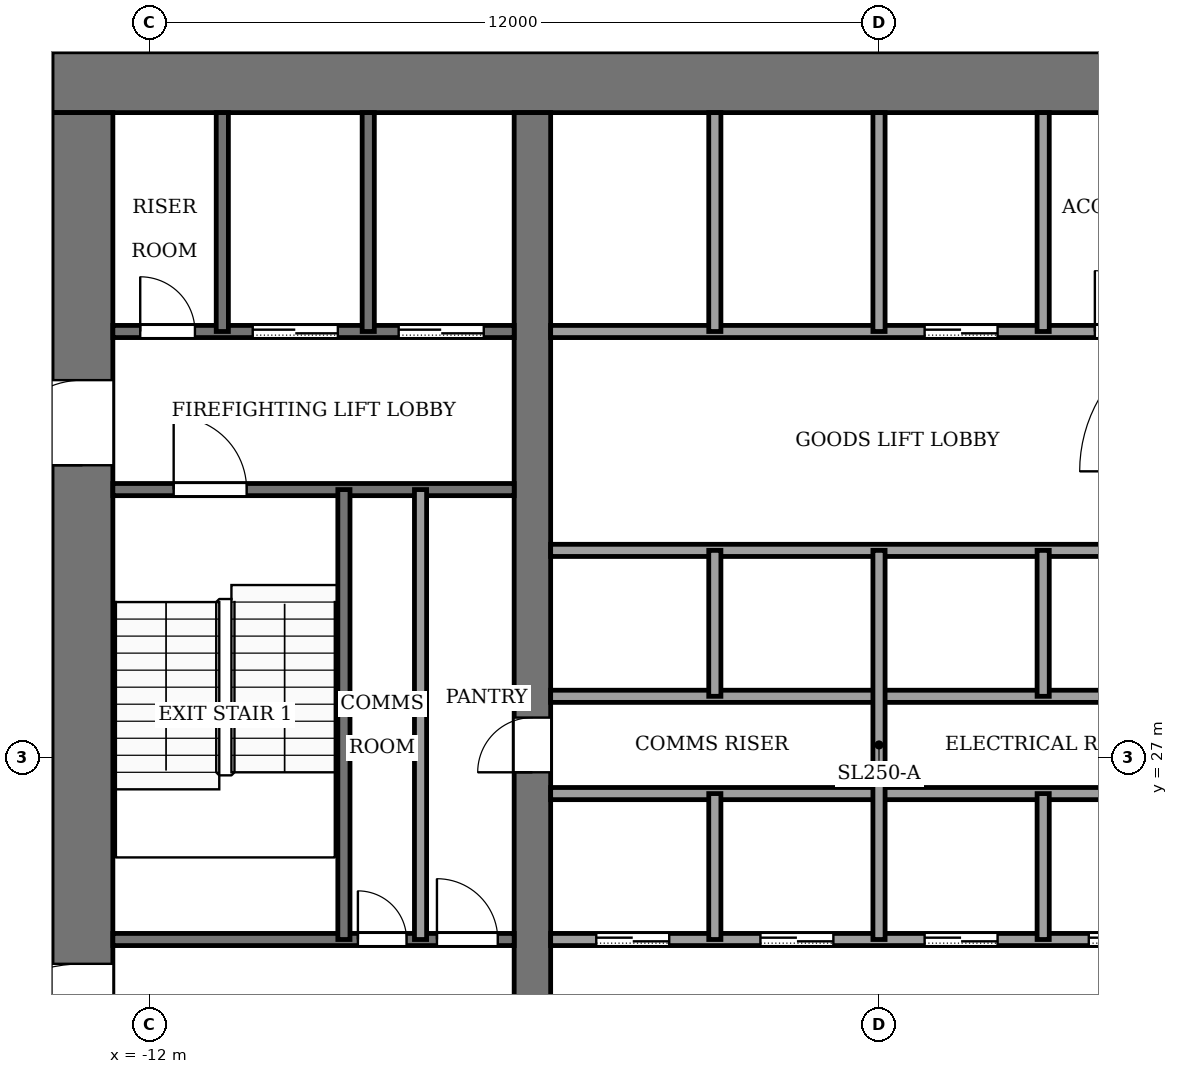
"""IFC4 building model, lengths in metres.
Left out: names, types, materials, properties, quantities, classifications, styles, units other than length and angle.
Written with IfcOpenShell. Run it as: python <this file> out.ifc"""

import sys

from ifc_helpers import new_model, si_unit, direction, frame, frame_2d, origin, place, context, subcontext, project, spatial, rectangle, extrude, element, fill, save


model = new_model("IFC4")
c1 = context("Model", 3, precision=1e-05, world=origin(), true_north=direction((0.0, 1.0)))
c2 = subcontext(c1, "Body", "Model", "MODEL_VIEW")
j1 = project(units=[si_unit("LENGTHUNIT", "METRE"), si_unit("PLANEANGLEUNIT", "RADIAN")], contexts=[c1])
p1 = place(None, origin())
s1 = spatial("IfcSite", under=j1, at=p1, CompositionType="ELEMENT")
p2 = place(p1, origin())
s2 = spatial("IfcBuilding", under=s1, at=p2, CompositionType="ELEMENT")
p3 = place(p2, frame((0.0, 0.0, 134.0)))
s3 = spatial("IfcBuildingStorey", under=s2, at=p3, CompositionType="ELEMENT", Elevation=134.0)
p4 = place(p3, frame((-13.6, 38.1, -0.13), z_axis=(0.0, 0.0, 1.0), x_axis=(1.0, 0.0, 0.0)))
e1 = element("IfcWall", 1, at=p4, inside=s3, PredefinedType="SHEAR", context=c2, shape_type="SweptSolid", body=[
    extrude(rectangle(XDim=27.2, YDim=1.0, at=frame_2d((13.6, 0.0))), origin(), (0.0, 0.0, 1.0), 4.0),
])
p5 = place(p3, frame((-13.1, 18.4, -0.13), z_axis=(0.0, 0.0, 1.0), x_axis=(0.0, 1.0, 0.0)))
e2 = element("IfcWall", 2, at=p5, inside=s3, PredefinedType="SHEAR", context=c2, shape_type="SweptSolid", body=[
    extrude(rectangle(XDim=19.2, YDim=1.0, at=frame_2d((9.6, 0.0))), origin(), (0.0, 0.0, 1.0), 4.0),
])
p6 = place(p5, frame((2.8, 0.0, 0.13)))
e3 = element("IfcOpeningElement", 3, at=p6, cuts=e2, PredefinedType="OPENING", context=c2, shape_type="SweptSolid", body=[
    extrude(rectangle(XDim=2.4, YDim=2.4, at=frame_2d((1.2, 1.2))), frame((0.0, 0.51, 0.0), z_axis=(0.0, -1.0, 0.0), x_axis=(1.0, 0.0, 0.0)), (0.0, 0.0, 1.0), 1.02),
])
p7 = place(p5, frame((13.4, 0.0, 0.13)))
e4 = element("IfcOpeningElement", 4, at=p7, cuts=e2, PredefinedType="OPENING", context=c2, shape_type="SweptSolid", body=[
    extrude(rectangle(XDim=1.4, YDim=2.2, at=frame_2d((0.7, 1.1))), frame((0.0, 0.51, 0.0), z_axis=(0.0, -1.0, 0.0), x_axis=(1.0, 0.0, 0.0)), (0.0, 0.0, 1.0), 1.02),
])
p8 = place(p3, frame((-5.7, 18.4, -0.13), z_axis=(0.0, 0.0, 1.0), x_axis=(0.0, 1.0, 0.0)))
e5 = element("IfcWall", 5, at=p8, inside=s3, PredefinedType="SHEAR", context=c2, shape_type="SweptSolid", body=[
    extrude(rectangle(XDim=19.2, YDim=0.6, at=frame_2d((9.6, 0.0))), origin(), (0.0, 0.0, 1.0), 4.0),
])
p9 = place(p8, frame((8.35, 0.0, 0.13)))
e6 = element("IfcOpeningElement", 6, at=p9, cuts=e5, PredefinedType="OPENING", context=c2, shape_type="SweptSolid", body=[
    extrude(rectangle(XDim=0.9, YDim=2.1, at=frame_2d((0.45, 1.05))), frame((0.0, 0.31, 0.0), z_axis=(0.0, -1.0, 0.0), x_axis=(1.0, 0.0, 0.0)), (0.0, 0.0, 1.0), 0.62),
])
p10 = place(p3, frame((-12.6, 24.0, 0.0), z_axis=(0.0, 0.0, 1.0), x_axis=(1.0, 0.0, 0.0)))
e7 = element("IfcWall", 7, at=p10, inside=s3, PredefinedType="PARTITIONING", context=c2, shape_type="SweptSolid", body=[
    extrude(rectangle(XDim=6.6, YDim=0.2, at=frame_2d((3.3, 0.0))), origin(), (0.0, 0.0, 1.0), 3.87),
])
p11 = place(p10, frame((4.03, 0.0, 0.0)))
e8 = element("IfcOpeningElement", 8, at=p11, cuts=e7, PredefinedType="OPENING", context=c2, shape_type="SweptSolid", body=[
    extrude(rectangle(XDim=0.8, YDim=2.1, at=frame_2d((0.4, 1.05))), frame((0.0, 0.11, 0.0), z_axis=(0.0, -1.0, 0.0), x_axis=(1.0, 0.0, 0.0)), (0.0, 0.0, 1.0), 0.22),
])
p12 = place(p10, frame((5.33, 0.0, 0.0)))
e9 = element("IfcOpeningElement", 9, at=p12, cuts=e7, PredefinedType="OPENING", context=c2, shape_type="SweptSolid", body=[
    extrude(rectangle(XDim=1.0, YDim=2.1, at=frame_2d((0.5, 1.05))), frame((0.0, 0.11, 0.0), z_axis=(0.0, -1.0, 0.0), x_axis=(1.0, 0.0, 0.0)), (0.0, 0.0, 1.0), 0.22),
])
p13 = place(p3, frame((-5.4, 24.0, 0.0), z_axis=(0.0, 0.0, 1.0), x_axis=(1.0, 0.0, 0.0)))
e10 = element("IfcWall", 10, at=p13, inside=s3, PredefinedType="PARTITIONING", context=c2, shape_type="SweptSolid", body=[
    extrude(rectangle(XDim=10.8, YDim=0.2, at=frame_2d((5.4, 0.0))), origin(), (0.0, 0.0, 1.0), 3.87),
])
p14 = place(p13, frame((0.75, 0.0, 0.0)))
e11 = element("IfcOpeningElement", 11, at=p14, cuts=e10, PredefinedType="OPENING", context=c2, shape_type="SweptSolid", body=[
    extrude(rectangle(XDim=1.2, YDim=2.2, at=frame_2d((0.6, 1.1))), frame((0.0, 0.11, 0.0), z_axis=(0.0, -1.0, 0.0), x_axis=(1.0, 0.0, 0.0)), (0.0, 0.0, 1.0), 0.22),
])
p15 = place(p13, frame((3.45, 0.0, 0.0)))
e12 = element("IfcOpeningElement", 12, at=p15, cuts=e10, PredefinedType="OPENING", context=c2, shape_type="SweptSolid", body=[
    extrude(rectangle(XDim=1.2, YDim=2.2, at=frame_2d((0.6, 1.1))), frame((0.0, 0.11, 0.0), z_axis=(0.0, -1.0, 0.0), x_axis=(1.0, 0.0, 0.0)), (0.0, 0.0, 1.0), 0.22),
])
p16 = place(p13, frame((6.15, 0.0, 0.0)))
e13 = element("IfcOpeningElement", 13, at=p16, cuts=e10, PredefinedType="OPENING", context=c2, shape_type="SweptSolid", body=[
    extrude(rectangle(XDim=1.2, YDim=2.2, at=frame_2d((0.6, 1.1))), frame((0.0, 0.11, 0.0), z_axis=(0.0, -1.0, 0.0), x_axis=(1.0, 0.0, 0.0)), (0.0, 0.0, 1.0), 0.22),
])
p17 = place(p13, frame((8.85, 0.0, 0.0)))
e14 = element("IfcOpeningElement", 14, at=p17, cuts=e10, PredefinedType="OPENING", context=c2, shape_type="SweptSolid", body=[
    extrude(rectangle(XDim=1.2, YDim=2.2, at=frame_2d((0.6, 1.1))), frame((0.0, 0.11, 0.0), z_axis=(0.0, -1.0, 0.0), x_axis=(1.0, 0.0, 0.0)), (0.0, 0.0, 1.0), 0.22),
])
for number, where, z_axis, x_axis in (
    (15, (-5.4, 26.4, 0.0), (0.0, 0.0, 1.0), (1.0, 0.0, 0.0)),
    (16, (-5.4, 28.0, 0.0), (0.0, 0.0, 1.0), (1.0, 0.0, 0.0)),
    (17, (-5.4, 30.4, 0.0), (0.0, 0.0, 1.0), (1.0, 0.0, 0.0)),
):
    element("IfcWall", number, at=place(p3, frame(where, z_axis=z_axis, x_axis=x_axis)), inside=s3, PredefinedType="PARTITIONING", context=c2, shape_type="SweptSolid", body=[
        extrude(rectangle(XDim=10.8, YDim=0.2, at=frame_2d((5.4, 0.0))), origin(), (0.0, 0.0, 1.0), 3.87),
    ])
p18 = place(p3, frame((-12.6, 31.4, 0.0), z_axis=(0.0, 0.0, 1.0), x_axis=(1.0, 0.0, 0.0)))
e18 = element("IfcWall", 18, at=p18, inside=s3, PredefinedType="PARTITIONING", context=c2, shape_type="SweptSolid", body=[
    extrude(rectangle(XDim=6.6, YDim=0.2, at=frame_2d((3.3, 0.0))), origin(), (0.0, 0.0, 1.0), 3.87),
])
p19 = place(p18, frame((1.0, 0.0, 0.0)))
e19 = element("IfcOpeningElement", 19, at=p19, cuts=e18, PredefinedType="OPENING", context=c2, shape_type="SweptSolid", body=[
    extrude(rectangle(XDim=1.2, YDim=2.2, at=frame_2d((0.6, 1.1))), frame((0.0, 0.11, 0.0), z_axis=(0.0, -1.0, 0.0), x_axis=(1.0, 0.0, 0.0)), (0.0, 0.0, 1.0), 0.22),
])
p20 = place(p3, frame((-12.6, 34.0, 0.0), z_axis=(0.0, 0.0, 1.0), x_axis=(1.0, 0.0, 0.0)))
e20 = element("IfcWall", 20, at=p20, inside=s3, PredefinedType="PARTITIONING", context=c2, shape_type="SweptSolid", body=[
    extrude(rectangle(XDim=6.6, YDim=0.2, at=frame_2d((3.3, 0.0))), origin(), (0.0, 0.0, 1.0), 3.87),
])
p21 = place(p20, frame((4.7, 0.0, 0.0)))
e21 = element("IfcOpeningElement", 21, at=p21, cuts=e20, PredefinedType="OPENING", context=c2, shape_type="SweptSolid", body=[
    extrude(rectangle(XDim=1.4, YDim=2.2, at=frame_2d((0.7, 1.1))), frame((0.0, 0.11, 0.0), z_axis=(0.0, -1.0, 0.0), x_axis=(1.0, 0.0, 0.0)), (0.0, 0.0, 1.0), 0.22),
])
p22 = place(p20, frame((2.3, 0.0, 0.0)))
e22 = element("IfcOpeningElement", 22, at=p22, cuts=e20, PredefinedType="OPENING", context=c2, shape_type="SweptSolid", body=[
    extrude(rectangle(XDim=1.4, YDim=2.2, at=frame_2d((0.7, 1.1))), frame((0.0, 0.11, 0.0), z_axis=(0.0, -1.0, 0.0), x_axis=(1.0, 0.0, 0.0)), (0.0, 0.0, 1.0), 0.22),
])
p23 = place(p20, frame((0.45, 0.0, 0.0)))
e23 = element("IfcOpeningElement", 23, at=p23, cuts=e20, PredefinedType="OPENING", context=c2, shape_type="SweptSolid", body=[
    extrude(rectangle(XDim=0.9, YDim=2.1, at=frame_2d((0.45, 1.05))), frame((0.0, 0.11, 0.0), z_axis=(0.0, -1.0, 0.0), x_axis=(1.0, 0.0, 0.0)), (0.0, 0.0, 1.0), 0.22),
])
p24 = place(p3, frame((-5.4, 34.0, 0.0), z_axis=(0.0, 0.0, 1.0), x_axis=(1.0, 0.0, 0.0)))
e24 = element("IfcWall", 24, at=p24, inside=s3, PredefinedType="PARTITIONING", context=c2, shape_type="SweptSolid", body=[
    extrude(rectangle(XDim=10.8, YDim=0.2, at=frame_2d((5.4, 0.0))), origin(), (0.0, 0.0, 1.0), 3.87),
])
p25 = place(p24, frame((6.15, 0.0, 0.0)))
e25 = element("IfcOpeningElement", 25, at=p25, cuts=e24, PredefinedType="OPENING", context=c2, shape_type="SweptSolid", body=[
    extrude(rectangle(XDim=1.2, YDim=2.2, at=frame_2d((0.6, 1.1))), frame((0.0, 0.11, 0.0), z_axis=(0.0, -1.0, 0.0), x_axis=(1.0, 0.0, 0.0)), (0.0, 0.0, 1.0), 0.22),
])
p26 = place(p24, frame((8.95, 0.0, 0.0)))
e26 = element("IfcOpeningElement", 26, at=p26, cuts=e24, PredefinedType="OPENING", context=c2, shape_type="SweptSolid", body=[
    extrude(rectangle(XDim=1.0, YDim=2.1, at=frame_2d((0.5, 1.05))), frame((0.0, 0.11, 0.0), z_axis=(0.0, -1.0, 0.0), x_axis=(1.0, 0.0, 0.0)), (0.0, 0.0, 1.0), 0.22),
])
p27 = place(p3, frame((-10.8, 34.0, 0.0), z_axis=(0.0, 0.0, 1.0), x_axis=(0.0, 1.0, 0.0)))
e27 = element("IfcWall", 27, at=p27, inside=s3, PredefinedType="PARTITIONING", context=c2, shape_type="SweptSolid", body=[
    extrude(rectangle(XDim=3.6, YDim=0.2, at=frame_2d((1.8, 0.0))), origin(), (0.0, 0.0, 1.0), 3.87),
])
p28 = place(p3, frame((-8.8, 24.0, 0.0), z_axis=(0.0, 0.0, 1.0), x_axis=(0.0, 1.0, 0.0)))
e28 = element("IfcWall", 28, at=p28, inside=s3, PredefinedType="PARTITIONING", context=c2, shape_type="SweptSolid", body=[
    extrude(rectangle(XDim=7.4, YDim=0.2, at=frame_2d((3.7, 0.0))), origin(), (0.0, 0.0, 1.0), 3.87),
])
p29 = place(p3, frame((-8.4, 34.0, 0.0), z_axis=(0.0, 0.0, 1.0), x_axis=(0.0, 1.0, 0.0)))
e29 = element("IfcWall", 29, at=p29, inside=s3, PredefinedType="PARTITIONING", context=c2, shape_type="SweptSolid", body=[
    extrude(rectangle(XDim=3.6, YDim=0.2, at=frame_2d((1.8, 0.0))), origin(), (0.0, 0.0, 1.0), 3.87),
])
p30 = place(p3, frame((-7.54, 24.0, 0.0), z_axis=(0.0, 0.0, 1.0), x_axis=(0.0, 1.0, 0.0)))
e30 = element("IfcWall", 30, at=p30, inside=s3, PredefinedType="PARTITIONING", context=c2, shape_type="SweptSolid", body=[
    extrude(rectangle(XDim=7.4, YDim=0.2, at=frame_2d((3.7, 0.0))), origin(), (0.0, 0.0, 1.0), 3.87),
])
for number, where, z_axis, x_axis in (
    (31, (-2.7, 24.0, 0.0), (0.0, 0.0, 1.0), (0.0, 1.0, 0.0)),
    (32, (-2.7, 28.0, 0.0), (0.0, 0.0, 1.0), (0.0, 1.0, 0.0)),
):
    element("IfcWall", number, at=place(p3, frame(where, z_axis=z_axis, x_axis=x_axis)), inside=s3, PredefinedType="PARTITIONING", context=c2, shape_type="SweptSolid", body=[
        extrude(rectangle(XDim=2.4, YDim=0.2, at=frame_2d((1.2, 0.0))), origin(), (0.0, 0.0, 1.0), 3.87),
    ])
p31 = place(p3, frame((-2.7, 34.0, 0.0), z_axis=(0.0, 0.0, 1.0), x_axis=(0.0, 1.0, 0.0)))
e33 = element("IfcWall", 33, at=p31, inside=s3, PredefinedType="PARTITIONING", context=c2, shape_type="SweptSolid", body=[
    extrude(rectangle(XDim=3.6, YDim=0.2, at=frame_2d((1.8, 0.0))), origin(), (0.0, 0.0, 1.0), 3.87),
])
p32 = place(p3, frame((0.0, 24.0, 0.0), z_axis=(0.0, 0.0, 1.0), x_axis=(0.0, 1.0, 0.0)))
e34 = element("IfcWall", 34, at=p32, inside=s3, PredefinedType="PARTITIONING", context=c2, shape_type="SweptSolid", body=[
    extrude(rectangle(XDim=6.4, YDim=0.2, at=frame_2d((3.2, 0.0))), origin(), (0.0, 0.0, 1.0), 3.87),
])
p33 = place(p3, frame((0.0, 34.0, 0.0), z_axis=(0.0, 0.0, 1.0), x_axis=(0.0, 1.0, 0.0)))
e35 = element("IfcWall", 35, at=p33, inside=s3, PredefinedType="PARTITIONING", context=c2, shape_type="SweptSolid", body=[
    extrude(rectangle(XDim=3.6, YDim=0.2, at=frame_2d((1.8, 0.0))), origin(), (0.0, 0.0, 1.0), 3.87),
])
for number, where, z_axis, x_axis in (
    (36, (2.7, 24.0, 0.0), (0.0, 0.0, 1.0), (0.0, 1.0, 0.0)),
    (37, (2.7, 28.0, 0.0), (0.0, 0.0, 1.0), (0.0, 1.0, 0.0)),
):
    element("IfcWall", number, at=place(p3, frame(where, z_axis=z_axis, x_axis=x_axis)), inside=s3, PredefinedType="PARTITIONING", context=c2, shape_type="SweptSolid", body=[
        extrude(rectangle(XDim=2.4, YDim=0.2, at=frame_2d((1.2, 0.0))), origin(), (0.0, 0.0, 1.0), 3.87),
    ])
p34 = place(p3, frame((2.7, 34.0, 0.0), z_axis=(0.0, 0.0, 1.0), x_axis=(0.0, 1.0, 0.0)))
e38 = element("IfcWall", 38, at=p34, inside=s3, PredefinedType="PARTITIONING", context=c2, shape_type="SweptSolid", body=[
    extrude(rectangle(XDim=3.6, YDim=0.2, at=frame_2d((1.8, 0.0))), origin(), (0.0, 0.0, 1.0), 3.87),
])
p35 = place(p14, origin())
e39 = element("IfcDoor", 39, at=p35, inside=s3, OperationType="SLIDING_TO_LEFT", PredefinedType="DOOR", context=c2, shape_type="SweptSolid", body=[
    extrude(rectangle(XDim=1.2, YDim=2.2, at=frame_2d((0.6, 1.1))), frame((0.0, 0.025, 0.0), z_axis=(0.0, -1.0, 0.0), x_axis=(1.0, 0.0, 0.0)), (0.0, 0.0, 1.0), 0.05),
])
fill(e11, e39)
p36 = place(p15, origin())
e40 = element("IfcDoor", 40, at=p36, inside=s3, OperationType="SLIDING_TO_LEFT", PredefinedType="DOOR", context=c2, shape_type="SweptSolid", body=[
    extrude(rectangle(XDim=1.2, YDim=2.2, at=frame_2d((0.6, 1.1))), frame((0.0, 0.025, 0.0), z_axis=(0.0, -1.0, 0.0), x_axis=(1.0, 0.0, 0.0)), (0.0, 0.0, 1.0), 0.05),
])
fill(e12, e40)
p37 = place(p16, origin())
e41 = element("IfcDoor", 41, at=p37, inside=s3, OperationType="SLIDING_TO_LEFT", PredefinedType="DOOR", context=c2, shape_type="SweptSolid", body=[
    extrude(rectangle(XDim=1.2, YDim=2.2, at=frame_2d((0.6, 1.1))), frame((0.0, 0.025, 0.0), z_axis=(0.0, -1.0, 0.0), x_axis=(1.0, 0.0, 0.0)), (0.0, 0.0, 1.0), 0.05),
])
fill(e13, e41)
p38 = place(p17, origin())
e42 = element("IfcDoor", 42, at=p38, inside=s3, OperationType="SLIDING_TO_LEFT", PredefinedType="DOOR", context=c2, shape_type="SweptSolid", body=[
    extrude(rectangle(XDim=1.2, YDim=2.2, at=frame_2d((0.6, 1.1))), frame((0.0, 0.025, 0.0), z_axis=(0.0, -1.0, 0.0), x_axis=(1.0, 0.0, 0.0)), (0.0, 0.0, 1.0), 0.05),
])
fill(e14, e42)
p39 = place(p25, origin())
e43 = element("IfcDoor", 43, at=p39, inside=s3, OperationType="SLIDING_TO_LEFT", PredefinedType="DOOR", context=c2, shape_type="SweptSolid", body=[
    extrude(rectangle(XDim=1.2, YDim=2.2, at=frame_2d((0.6, 1.1))), frame((0.0, 0.025, 0.0), z_axis=(0.0, -1.0, 0.0), x_axis=(1.0, 0.0, 0.0)), (0.0, 0.0, 1.0), 0.05),
])
fill(e25, e43)
p40 = place(p21, origin())
e44 = element("IfcDoor", 44, at=p40, inside=s3, OperationType="SLIDING_TO_LEFT", PredefinedType="DOOR", context=c2, shape_type="SweptSolid", body=[
    extrude(rectangle(XDim=1.4, YDim=2.2, at=frame_2d((0.7, 1.1))), frame((0.0, 0.025, 0.0), z_axis=(0.0, -1.0, 0.0), x_axis=(1.0, 0.0, 0.0)), (0.0, 0.0, 1.0), 0.05),
])
fill(e21, e44)
p41 = place(p22, origin())
e45 = element("IfcDoor", 45, at=p41, inside=s3, OperationType="SLIDING_TO_LEFT", PredefinedType="DOOR", context=c2, shape_type="SweptSolid", body=[
    extrude(rectangle(XDim=1.4, YDim=2.2, at=frame_2d((0.7, 1.1))), frame((0.0, 0.025, 0.0), z_axis=(0.0, -1.0, 0.0), x_axis=(1.0, 0.0, 0.0)), (0.0, 0.0, 1.0), 0.05),
])
fill(e22, e45)
p42 = place(p23, origin())
e46 = element("IfcDoor", 46, at=p42, inside=s3, OperationType="SINGLE_SWING_RIGHT", PredefinedType="DOOR", context=c2, shape_type="SweptSolid", body=[
    extrude(rectangle(XDim=0.9, YDim=2.1, at=frame_2d((0.45, 1.05))), frame((0.0, 0.025, 0.0), z_axis=(0.0, -1.0, 0.0), x_axis=(1.0, 0.0, 0.0)), (0.0, 0.0, 1.0), 0.05),
])
fill(e23, e46)
p43 = place(p11, origin())
e47 = element("IfcDoor", 47, at=p43, inside=s3, OperationType="SINGLE_SWING_RIGHT", PredefinedType="DOOR", context=c2, shape_type="SweptSolid", body=[
    extrude(rectangle(XDim=0.8, YDim=2.1, at=frame_2d((0.4, 1.05))), frame((0.0, 0.025, 0.0), z_axis=(0.0, -1.0, 0.0), x_axis=(1.0, 0.0, 0.0)), (0.0, 0.0, 1.0), 0.05),
])
fill(e8, e47)
p44 = place(p12, origin())
e48 = element("IfcDoor", 48, at=p44, inside=s3, OperationType="SINGLE_SWING_LEFT", PredefinedType="DOOR", context=c2, shape_type="SweptSolid", body=[
    extrude(rectangle(XDim=1.0, YDim=2.1, at=frame_2d((0.5, 1.05))), frame((0.0, 0.025, 0.0), z_axis=(0.0, -1.0, 0.0), x_axis=(1.0, 0.0, 0.0)), (0.0, 0.0, 1.0), 0.05),
])
fill(e9, e48)
p45 = place(p26, origin())
e49 = element("IfcDoor", 49, at=p45, inside=s3, OperationType="SINGLE_SWING_LEFT", PredefinedType="DOOR", context=c2, shape_type="SweptSolid", body=[
    extrude(rectangle(XDim=1.0, YDim=2.1, at=frame_2d((0.5, 1.05))), frame((0.0, 0.025, 0.0), z_axis=(0.0, -1.0, 0.0), x_axis=(1.0, 0.0, 0.0)), (0.0, 0.0, 1.0), 0.05),
])
fill(e26, e49)
p46 = place(p9, origin())
e50 = element("IfcDoor", 50, at=p46, inside=s3, OperationType="SINGLE_SWING_RIGHT", PredefinedType="DOOR", context=c2, shape_type="SweptSolid", body=[
    extrude(rectangle(XDim=0.9, YDim=2.1, at=frame_2d((0.45, 1.05))), frame((0.0, 0.025, 0.0), z_axis=(0.0, -1.0, 0.0), x_axis=(1.0, 0.0, 0.0)), (0.0, 0.0, 1.0), 0.05),
])
fill(e6, e50)
p47 = place(p19, origin())
e51 = element("IfcDoor", 51, at=p47, inside=s3, OperationType="SINGLE_SWING_LEFT", PredefinedType="DOOR", context=c2, shape_type="SweptSolid", body=[
    extrude(rectangle(XDim=1.2, YDim=2.2, at=frame_2d((0.6, 1.1))), frame((0.0, 0.025, 0.0), z_axis=(0.0, -1.0, 0.0), x_axis=(1.0, 0.0, 0.0)), (0.0, 0.0, 1.0), 0.05),
])
fill(e19, e51)
p48 = place(p6, origin())
e52 = element("IfcDoor", 52, at=p48, inside=s3, OperationType="DOUBLE_DOOR_SINGLE_SWING", PredefinedType="DOOR", context=c2, shape_type="SweptSolid", body=[
    extrude(rectangle(XDim=2.4, YDim=2.4, at=frame_2d((1.2, 1.2))), frame((0.0, 0.025, 0.0), z_axis=(0.0, -1.0, 0.0), x_axis=(1.0, 0.0, 0.0)), (0.0, 0.0, 1.0), 0.05),
])
fill(e3, e52)
p49 = place(p7, origin())
e53 = element("IfcDoor", 53, at=p49, inside=s3, OperationType="SINGLE_SWING_LEFT", PredefinedType="DOOR", context=c2, shape_type="SweptSolid", body=[
    extrude(rectangle(XDim=1.4, YDim=2.2, at=frame_2d((0.7, 1.1))), frame((0.0, 0.025, 0.0), z_axis=(0.0, -1.0, 0.0), x_axis=(1.0, 0.0, 0.0)), (0.0, 0.0, 1.0), 0.05),
])
fill(e4, e53)
save(model, sys.argv[1])
